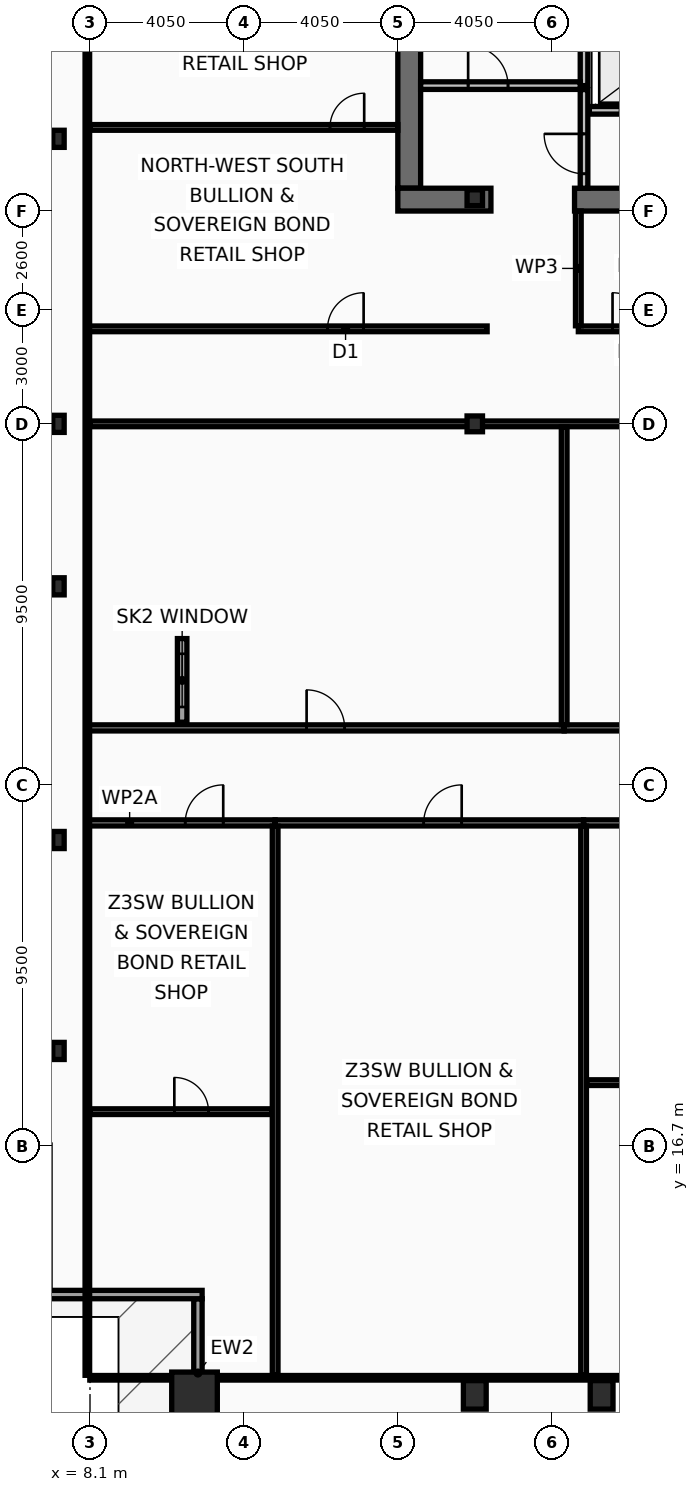
"""IFC4 building model, lengths in metres.
Left out: names, types, materials, properties, quantities, classifications, styles, units other than length and angle.
Written with IfcOpenShell. Run it as: python <this file> out.ifc"""

import sys

from ifc_helpers import new_model, si_unit, direction, frame, frame_2d, origin, origin_2d, place, context, subcontext, project, spatial, rectangle, hollow_rectangle, i_section, extrude, element, fill, save


model = new_model("IFC4")
c1 = context("Model", 3, precision=1e-05, world=origin(), true_north=direction((0.0, 1.0)))
c2 = subcontext(c1, "Body", "Model", "MODEL_VIEW")
j1 = project(units=[si_unit("LENGTHUNIT", "METRE"), si_unit("PLANEANGLEUNIT", "RADIAN")], contexts=[c1])
p1 = place(None, origin())
s1 = spatial("IfcSite", under=j1, at=p1, CompositionType="ELEMENT")
p2 = place(p1, origin())
s2 = spatial("IfcBuilding", under=s1, at=p2, CompositionType="ELEMENT")
p3 = place(p2, frame((0.0, 0.0, 188.6)))
s3 = spatial("IfcBuildingStorey", under=s2, at=p3, CompositionType="ELEMENT", Elevation=188.6)
p4 = place(p3, frame((16.5, 41.9, 0.0), z_axis=(0.0, 0.0, 1.0), x_axis=(0.0, 1.0, 0.0)))
e1 = element("IfcWall", 1, at=p4, inside=s3, PredefinedType="SHEAR", context=c2, shape_type="SweptSolid", body=[
    extrude(rectangle(XDim=11.2, YDim=0.6, at=frame_2d((5.6, 0.0))), origin(), (0.0, 0.0, 1.0), 3.44),
])
p5 = place(p3, frame((18.65, 41.6, 0.0), z_axis=(0.0, 0.0, 1.0), x_axis=(-1.0, 0.0, 0.0)))
e2 = element("IfcWall", 2, at=p5, inside=s3, PredefinedType="SHEAR", context=c2, shape_type="SweptSolid", body=[
    extrude(rectangle(XDim=2.45, YDim=0.6, at=frame_2d((1.225, 0.0))), origin(), (0.0, 0.0, 1.0), 3.44),
])
p6 = place(p3, frame((32.3, 41.6, 0.0), z_axis=(0.0, 0.0, 1.0), x_axis=(-1.0, 0.0, 0.0)))
e3 = element("IfcWall", 3, at=p6, inside=s3, PredefinedType="SHEAR", context=c2, shape_type="SweptSolid", body=[
    extrude(rectangle(XDim=11.45, YDim=0.6, at=frame_2d((5.725, 0.0))), origin(), (0.0, 0.0, 1.0), 3.44),
])
p7 = place(p3, frame((10.85, 10.15, 0.0), z_axis=(0.0, 0.0, 1.0), x_axis=(1.0, 0.0, 0.0)))
e4 = element("IfcColumn", 4, at=p7, inside=s3, PredefinedType="COLUMN", context=c2, shape_type="SweptSolid", body=[
    extrude(hollow_rectangle(XDim=1.2, YDim=1.2, WallThickness=0.06, at=origin_2d()), origin(), (0.0, 0.0, 1.0), 3.6),
])
for number, where, z_axis, x_axis in (
    (5, (18.225, 10.15, 0.0), (0.0, 0.0, 1.0), (1.0, 0.0, 0.0)),
    (6, (21.562, 10.15, 0.0), (0.0, 0.0, 1.0), (1.0, 0.0, 0.0)),
):
    element("IfcColumn", number, at=place(p3, frame(where, z_axis=z_axis, x_axis=x_axis)), inside=s3, PredefinedType="COLUMN", context=c2, shape_type="SweptSolid", body=[
        extrude(hollow_rectangle(XDim=0.6, YDim=0.75, WallThickness=0.045, at=origin_2d()), origin(), (0.0, 0.0, 1.0), 3.6),
    ])
for number, where, z_axis, x_axis in (
    (7, (7.27, 19.2, 0.0), (0.0, 0.0, 1.0), (1.0, 0.0, 0.0)),
    (8, (7.27, 24.75, 0.0), (0.0, 0.0, 1.0), (1.0, 0.0, 0.0)),
    (9, (7.27, 31.425, 0.0), (0.0, 0.0, 1.0), (1.0, 0.0, 0.0)),
    (10, (7.27, 35.7, 0.0), (0.0, 0.0, 1.0), (1.0, 0.0, 0.0)),
    (11, (7.27, 43.2, 0.0), (0.0, 0.0, 1.0), (1.0, 0.0, 0.0)),
):
    element("IfcColumn", number, at=place(p3, frame(where, z_axis=z_axis, x_axis=x_axis)), inside=s3, PredefinedType="COLUMN", context=c2, shape_type="SweptSolid", body=[
        extrude(i_section(OverallWidth=0.3, OverallDepth=0.45, WebThickness=0.014, FlangeThickness=0.026, at=origin_2d()), origin(), (0.0, 0.0, 1.0), 3.6),
    ])
for number, where, z_axis, x_axis in (
    (12, (18.225, 35.7, 0.0), (0.0, 0.0, 1.0), (1.0, 0.0, 0.0)),
    (13, (18.225, 41.65, 0.0), (0.0, 0.0, 1.0), (1.0, 0.0, 0.0)),
):
    element("IfcColumn", number, at=place(p3, frame(where, z_axis=z_axis, x_axis=x_axis)), inside=s3, PredefinedType="COLUMN", context=c2, shape_type="SweptSolid", body=[
        extrude(i_section(OverallWidth=0.406, OverallDepth=0.416, WebThickness=0.03, FlangeThickness=0.048, at=origin_2d()), origin(), (0.0, 0.0, 1.0), 3.6),
    ])
p8 = place(p3, frame((10.94, 8.77, 0.0), z_axis=(0.0, 0.0, 1.0), x_axis=(0.0, 1.0, 0.0)))
e14 = element("IfcWall", 14, at=p8, inside=s3, PredefinedType="SOLIDWALL", context=c2, shape_type="SweptSolid", body=[
    extrude(rectangle(XDim=3.91, YDim=0.22, at=frame_2d((1.955, 0.0))), origin(), (0.0, 0.0, 1.0), 2.83),
])
p9 = place(p3, frame((11.05, 12.79, 0.0), z_axis=(0.0, 0.0, 1.0), x_axis=(-1.0, 0.0, 0.0)))
e15 = element("IfcWall", 15, at=p9, inside=s3, PredefinedType="SOLIDWALL", context=c2, shape_type="SweptSolid", body=[
    extrude(rectangle(XDim=4.22, YDim=0.22, at=frame_2d((2.11, 0.0))), origin(), (0.0, 0.0, 1.0), 2.83),
])
p10 = place(p3, frame((10.525, 27.85, 0.0), z_axis=(0.0, 0.0, 1.0), x_axis=(0.0, 1.0, 0.0)))
e16 = element("IfcWall", 16, at=p10, inside=s3, PredefinedType="PARAPET", context=c2, shape_type="SweptSolid", body=[
    extrude(rectangle(XDim=2.2, YDim=0.25, at=frame_2d((1.1, 0.0))), origin(), (0.0, 0.0, 1.0), 0.88),
])
p11 = place(p10, frame((0.4, 0.0, 0.16)))
e17 = element("IfcOpeningElement", 17, at=p11, cuts=e16, PredefinedType="OPENING", context=c2, shape_type="SweptSolid", body=[
    extrude(rectangle(XDim=1.4, YDim=0.5, at=frame_2d((0.7, 0.25))), frame((0.0, 0.135, 0.0), z_axis=(0.0, -1.0, 0.0), x_axis=(1.0, 0.0, 0.0)), (0.0, 0.0, 1.0), 0.27),
])
p12 = place(p3, frame((24.21, 43.95, 0.0), z_axis=(0.0, 0.0, 1.0), x_axis=(-1.0, 0.0, 0.0)))
e18 = element("IfcWall", 18, at=p12, inside=s3, PredefinedType="PARTITIONING", context=c2, shape_type="SweptSolid", body=[
    extrude(rectangle(XDim=2.97, YDim=0.2, at=frame_2d((1.485, 0.0))), origin(), (0.0, 0.0, 1.0), 3.44),
])
p13 = place(p12, frame((0.86, 0.0, 0.0)))
e19 = element("IfcOpeningElement", 19, at=p13, cuts=e18, PredefinedType="OPENING", context=c2, shape_type="SweptSolid", body=[
    extrude(rectangle(XDim=1.3, YDim=2.18, at=frame_2d((0.65, 1.09))), frame((0.0, 0.11, 0.0), z_axis=(0.0, -1.0, 0.0), x_axis=(1.0, 0.0, 0.0)), (0.0, 0.0, 1.0), 0.22),
])
p14 = place(p3, frame((21.1, 44.6, 0.0), z_axis=(0.0, 0.0, 1.0), x_axis=(0.0, 1.0, 0.0)))
e20 = element("IfcWall", 20, at=p14, inside=s3, PredefinedType="PARTITIONING", context=c2, shape_type="SweptSolid", body=[
    extrude(rectangle(XDim=4.3, YDim=0.2, at=frame_2d((2.15, 0.0))), origin(), (0.0, 0.0, 1.0), 3.44),
])
p15 = place(p3, frame((16.8, 44.6, 0.0), z_axis=(0.0, 0.0, 1.0), x_axis=(1.0, 0.0, 0.0)))
e21 = element("IfcWall", 21, at=p15, inside=s3, PredefinedType="PARTITIONING", context=c2, shape_type="SweptSolid", body=[
    extrude(rectangle(XDim=4.2, YDim=0.2, at=frame_2d((2.1, 0.0))), origin(), (0.0, 0.0, 1.0), 3.44),
])
p16 = place(p15, frame((1.25, 0.0, 0.0)))
e22 = element("IfcOpeningElement", 22, at=p16, cuts=e21, PredefinedType="OPENING", context=c2, shape_type="SweptSolid", body=[
    extrude(rectangle(XDim=1.05, YDim=2.15, at=frame_2d((0.525, 1.075))), frame((0.0, 0.11, 0.0), z_axis=(0.0, -1.0, 0.0), x_axis=(1.0, 0.0, 0.0)), (0.0, 0.0, 1.0), 0.22),
])
p17 = place(p3, frame((21.1, 41.9, 0.0), z_axis=(0.0, 0.0, 1.0), x_axis=(0.0, 1.0, 0.0)))
e23 = element("IfcWall", 23, at=p17, inside=s3, PredefinedType="PARTITIONING", context=c2, shape_type="SweptSolid", body=[
    extrude(rectangle(XDim=2.595, YDim=0.2, at=frame_2d((1.298, 0.0))), origin(), (0.0, 0.0, 1.0), 3.44),
])
p18 = place(p17, frame((0.38, 0.0, 0.0)))
e24 = element("IfcOpeningElement", 24, at=p18, cuts=e23, PredefinedType="OPENING", context=c2, shape_type="SweptSolid", body=[
    extrude(rectangle(XDim=1.05, YDim=2.15, at=frame_2d((0.525, 1.075))), frame((0.0, 0.11, 0.0), z_axis=(0.0, -1.0, 0.0), x_axis=(1.0, 0.0, 0.0)), (0.0, 0.0, 1.0), 0.22),
])
p19 = place(p3, frame((20.95, 38.2, 0.0), z_axis=(0.0, 0.0, 1.0), x_axis=(1.0, 0.0, 0.0)))
e25 = element("IfcWall", 25, at=p19, inside=s3, PredefinedType="PARTITIONING", context=c2, shape_type="SweptSolid", body=[
    extrude(rectangle(XDim=3.35, YDim=0.15, at=frame_2d((1.675, 0.0))), origin(), (0.0, 0.0, 1.0), 3.44),
])
p20 = place(p19, frame((0.9, 0.0, 0.0)))
e26 = element("IfcOpeningElement", 26, at=p20, cuts=e25, PredefinedType="OPENING", context=c2, shape_type="SweptSolid", body=[
    extrude(rectangle(XDim=0.95, YDim=2.05, at=frame_2d((0.475, 1.025))), frame((0.0, 0.085, 0.0), z_axis=(0.0, -1.0, 0.0), x_axis=(1.0, 0.0, 0.0)), (0.0, 0.0, 1.0), 0.17),
])
p21 = place(p3, frame((20.95, 38.28, 0.0), z_axis=(0.0, 0.0, 1.0), x_axis=(0.0, 1.0, 0.0)))
e27 = element("IfcWall", 27, at=p21, inside=s3, PredefinedType="PARTITIONING", context=c2, shape_type="SweptSolid", body=[
    extrude(rectangle(XDim=3.02, YDim=0.15, at=frame_2d((1.51, 0.0))), origin(), (0.0, 0.0, 1.0), 3.44),
])
p22 = place(p3, frame((8.03, 38.2, 0.0), z_axis=(0.0, 0.0, 1.0), x_axis=(1.0, 0.0, 0.0)))
e28 = element("IfcWall", 28, at=p22, inside=s3, PredefinedType="PARTITIONING", context=c2, shape_type="SweptSolid", body=[
    extrude(rectangle(XDim=10.52, YDim=0.15, at=frame_2d((5.26, 0.0))), origin(), (0.0, 0.0, 1.0), 2.73),
])
p23 = place(p22, frame((6.32, 0.0, 0.0)))
e29 = element("IfcOpeningElement", 29, at=p23, cuts=e28, PredefinedType="OPENING", context=c2, shape_type="SweptSolid", body=[
    extrude(rectangle(XDim=0.95, YDim=2.05, at=frame_2d((0.475, 1.025))), frame((0.0, 0.085, 0.0), z_axis=(0.0, -1.0, 0.0), x_axis=(1.0, 0.0, 0.0)), (0.0, 0.0, 1.0), 0.17),
])
p24 = place(p3, frame((8.095, 43.5, 0.0), z_axis=(0.0, 0.0, 1.0), x_axis=(1.0, 0.0, 0.0)))
e30 = element("IfcWall", 30, at=p24, inside=s3, PredefinedType="PARTITIONING", context=c2, shape_type="SweptSolid", body=[
    extrude(rectangle(XDim=8.105, YDim=0.15, at=frame_2d((4.052, 0.0))), origin(), (0.0, 0.0, 1.0), 2.73),
])
p25 = place(p24, frame((6.32, 0.0, 0.0)))
e31 = element("IfcOpeningElement", 31, at=p25, cuts=e30, PredefinedType="OPENING", context=c2, shape_type="SweptSolid", body=[
    extrude(rectangle(XDim=0.9, YDim=2.05, at=frame_2d((0.45, 1.025))), frame((0.0, 0.085, 0.0), z_axis=(0.0, -1.0, 0.0), x_axis=(1.0, 0.0, 0.0)), (0.0, 0.0, 1.0), 0.17),
])
p26 = place(p3, frame((8.095, 35.7, 0.0), z_axis=(0.0, 0.0, 1.0), x_axis=(1.0, 0.0, 0.0)))
e32 = element("IfcWall", 32, at=p26, inside=s3, PredefinedType="PARTITIONING", context=c2, shape_type="SweptSolid", body=[
    extrude(rectangle(XDim=24.925, YDim=0.15, at=frame_2d((12.462, 0.0))), origin(), (0.0, 0.0, 1.0), 2.73),
])
p27 = place(p3, frame((8.03, 25.2, 0.0), z_axis=(0.0, 0.0, 1.0), x_axis=(1.0, 0.0, 0.0)))
e33 = element("IfcWall", 33, at=p27, inside=s3, PredefinedType="PARTITIONING", context=c2, shape_type="SweptSolid", body=[
    extrude(rectangle(XDim=4.942, YDim=0.16, at=frame_2d((2.471, 0.0))), origin(), (0.0, 0.0, 1.0), 3.44),
])
p28 = place(p27, frame((2.576, 0.0, 0.0)))
e34 = element("IfcOpeningElement", 34, at=p28, cuts=e33, PredefinedType="OPENING", context=c2, shape_type="SweptSolid", body=[
    extrude(rectangle(XDim=1.0, YDim=2.05, at=frame_2d((0.5, 1.025))), frame((0.0, 0.09, 0.0), z_axis=(0.0, -1.0, 0.0), x_axis=(1.0, 0.0, 0.0)), (0.0, 0.0, 1.0), 0.18),
])
p29 = place(p3, frame((8.095, 17.602, 0.0), z_axis=(0.0, 0.0, 1.0), x_axis=(1.0, 0.0, 0.0)))
e35 = element("IfcWall", 35, at=p29, inside=s3, PredefinedType="PARTITIONING", context=c2, shape_type="SweptSolid", body=[
    extrude(rectangle(XDim=4.797, YDim=0.15, at=frame_2d((2.398, 0.0))), origin(), (0.0, 0.0, 1.0), 2.83),
])
p30 = place(p29, frame((2.224, 0.0, 0.0)))
e36 = element("IfcOpeningElement", 36, at=p30, cuts=e35, PredefinedType="OPENING", context=c2, shape_type="SweptSolid", body=[
    extrude(rectangle(XDim=0.9, YDim=2.05, at=frame_2d((0.45, 1.025))), frame((0.0, 0.085, 0.0), z_axis=(0.0, -1.0, 0.0), x_axis=(1.0, 0.0, 0.0)), (0.0, 0.0, 1.0), 0.17),
])
p31 = place(p3, frame((12.972, 25.2, 0.0), z_axis=(0.0, 0.0, 1.0), x_axis=(1.0, 0.0, 0.0)))
e37 = element("IfcWall", 37, at=p31, inside=s3, PredefinedType="PARTITIONING", context=c2, shape_type="SweptSolid", body=[
    extrude(rectangle(XDim=8.116, YDim=0.16, at=frame_2d((4.058, 0.0))), origin(), (0.0, 0.0, 1.0), 2.73),
])
p32 = place(p31, frame((3.909, 0.0, 0.0)))
e38 = element("IfcOpeningElement", 38, at=p32, cuts=e37, PredefinedType="OPENING", context=c2, shape_type="SweptSolid", body=[
    extrude(rectangle(XDim=1.0, YDim=2.05, at=frame_2d((0.5, 1.025))), frame((0.0, 0.09, 0.0), z_axis=(0.0, -1.0, 0.0), x_axis=(1.0, 0.0, 0.0)), (0.0, 0.0, 1.0), 0.18),
])
p33 = place(p3, frame((12.972, 10.665, 0.0), z_axis=(0.0, 0.0, 1.0), x_axis=(0.0, 1.0, 0.0)))
e39 = element("IfcWall", 39, at=p33, inside=s3, PredefinedType="PARTITIONING", context=c2, shape_type="SweptSolid", body=[
    extrude(rectangle(XDim=14.45, YDim=0.15, at=frame_2d((7.225, 0.0))), origin(), (0.0, 0.0, 1.0), 2.73),
])
p34 = place(p3, frame((21.088, 25.2, 0.0), z_axis=(0.0, 0.0, 1.0), x_axis=(1.0, 0.0, 0.0)))
e40 = element("IfcWall", 40, at=p34, inside=s3, PredefinedType="PARTITIONING", context=c2, shape_type="SweptSolid", body=[
    extrude(rectangle(XDim=12.012, YDim=0.16, at=frame_2d((6.006, 0.0))), origin(), (0.0, 0.0, 1.0), 2.73),
])
p35 = place(p34, frame((5.545, 0.0, 0.0)))
e41 = element("IfcOpeningElement", 41, at=p35, cuts=e40, PredefinedType="OPENING", context=c2, shape_type="SweptSolid", body=[
    extrude(rectangle(XDim=1.0, YDim=2.05, at=frame_2d((0.5, 1.025))), frame((0.0, 0.09, 0.0), z_axis=(0.0, -1.0, 0.0), x_axis=(1.0, 0.0, 0.0)), (0.0, 0.0, 1.0), 0.18),
])
p36 = place(p3, frame((21.088, 10.665, 0.0), z_axis=(0.0, 0.0, 1.0), x_axis=(0.0, 1.0, 0.0)))
e42 = element("IfcWall", 42, at=p36, inside=s3, PredefinedType="PARTITIONING", context=c2, shape_type="SweptSolid", body=[
    extrude(rectangle(XDim=14.45, YDim=0.15, at=frame_2d((7.225, 0.0))), origin(), (0.0, 0.0, 1.0), 2.93),
])
p37 = place(p3, frame((21.168, 18.366, 0.0), z_axis=(0.0, 0.0, 1.0), x_axis=(1.0, 0.0, 0.0)))
e43 = element("IfcWall", 43, at=p37, inside=s3, PredefinedType="PARTITIONING", context=c2, shape_type="SweptSolid", body=[
    extrude(rectangle(XDim=11.852, YDim=0.15, at=frame_2d((5.926, 0.0))), origin(), (0.0, 0.0, 1.0), 2.73),
])
p38 = place(p37, frame((5.405, 0.0, 0.0)))
e44 = element("IfcOpeningElement", 44, at=p38, cuts=e43, PredefinedType="OPENING", context=c2, shape_type="SweptSolid", body=[
    extrude(rectangle(XDim=0.9, YDim=2.05, at=frame_2d((0.45, 1.025))), frame((0.0, 0.085, 0.0), z_axis=(0.0, -1.0, 0.0), x_axis=(1.0, 0.0, 0.0)), (0.0, 0.0, 1.0), 0.17),
])
p39 = place(p3, frame((8.03, 27.7, 0.0), z_axis=(0.0, 0.0, 1.0), x_axis=(1.0, 0.0, 0.0)))
e45 = element("IfcWall", 45, at=p39, inside=s3, PredefinedType="PARTITIONING", context=c2, shape_type="SweptSolid", body=[
    extrude(rectangle(XDim=12.547, YDim=0.16, at=frame_2d((6.273, 0.0))), origin(), (0.0, 0.0, 1.0), 2.73),
])
p40 = place(p39, frame((5.77, 0.0, 0.0)))
e46 = element("IfcOpeningElement", 46, at=p40, cuts=e45, PredefinedType="OPENING", context=c2, shape_type="SweptSolid", body=[
    extrude(rectangle(XDim=1.0, YDim=2.05, at=frame_2d((0.5, 1.025))), frame((0.0, 0.09, 0.0), z_axis=(0.0, -1.0, 0.0), x_axis=(1.0, 0.0, 0.0)), (0.0, 0.0, 1.0), 0.18),
])
p41 = place(p3, frame((20.577, 27.7, 0.0), z_axis=(0.0, 0.0, 1.0), x_axis=(1.0, 0.0, 0.0)))
e47 = element("IfcWall", 47, at=p41, inside=s3, PredefinedType="PARTITIONING", context=c2, shape_type="SweptSolid", body=[
    extrude(rectangle(XDim=12.523, YDim=0.16, at=frame_2d((6.261, 0.0))), origin(), (0.0, 0.0, 1.0), 2.73),
])
p42 = place(p41, frame((5.76, 0.0, 0.0)))
e48 = element("IfcOpeningElement", 48, at=p42, cuts=e47, PredefinedType="OPENING", context=c2, shape_type="SweptSolid", body=[
    extrude(rectangle(XDim=1.0, YDim=2.05, at=frame_2d((0.5, 1.025))), frame((0.0, 0.09, 0.0), z_axis=(0.0, -1.0, 0.0), x_axis=(1.0, 0.0, 0.0)), (0.0, 0.0, 1.0), 0.18),
])
p43 = place(p3, frame((20.577, 27.785, 0.0), z_axis=(0.0, 0.0, 1.0), x_axis=(0.0, 1.0, 0.0)))
e49 = element("IfcWall", 49, at=p43, inside=s3, PredefinedType="PARTITIONING", context=c2, shape_type="SweptSolid", body=[
    extrude(rectangle(XDim=7.835, YDim=0.15, at=frame_2d((3.917, 0.0))), origin(), (0.0, 0.0, 1.0), 2.93),
])
p44 = place(p3, frame((8.03, 10.665, 0.0), z_axis=(0.0, 0.0, 1.0), x_axis=(0.0, 1.0, 0.0)))
e50 = element("IfcWall", 50, at=p44, inside=s3, PredefinedType="PARTITIONING", context=c2, shape_type="SweptSolid", body=[
    extrude(rectangle(XDim=42.11, YDim=0.12, at=frame_2d((21.055, 0.0))), origin(), (0.0, 0.0, 1.0), 2.73),
])
p45 = place(p3, frame((8.095, 10.6, 0.0), z_axis=(0.0, 0.0, 1.0), x_axis=(1.0, 0.0, 0.0)))
e51 = element("IfcWall", 51, at=p45, inside=s3, PredefinedType="PARTITIONING", context=c2, shape_type="SweptSolid", body=[
    extrude(rectangle(XDim=56.71, YDim=0.12, at=frame_2d((28.355, 0.0))), origin(), (0.0, 0.0, 1.0), 2.73),
])
p46 = place(p11, origin())
e52 = element("IfcWindow", 52, at=p46, inside=s3, PartitioningType="SINGLE_PANEL", PredefinedType="SKYLIGHT", context=c2, shape_type="SweptSolid", body=[
    extrude(rectangle(XDim=1.4, YDim=0.5, at=frame_2d((0.7, 0.25))), frame((0.0, 0.03, 0.0), z_axis=(0.0, -1.0, 0.0), x_axis=(1.0, 0.0, 0.0)), (0.0, 0.0, 1.0), 0.06),
])
fill(e17, e52)
p47 = place(p16, origin())
e53 = element("IfcDoor", 53, at=p47, inside=s3, OperationType="SINGLE_SWING_LEFT", PredefinedType="DOOR", context=c2, shape_type="SweptSolid", body=[
    extrude(rectangle(XDim=1.05, YDim=2.15, at=frame_2d((0.525, 1.075))), frame((0.0, 0.025, 0.0), z_axis=(0.0, -1.0, 0.0), x_axis=(1.0, 0.0, 0.0)), (0.0, 0.0, 1.0), 0.05),
])
fill(e22, e53)
p48 = place(p18, origin())
e54 = element("IfcDoor", 54, at=p48, inside=s3, OperationType="SINGLE_SWING_RIGHT", PredefinedType="DOOR", context=c2, shape_type="SweptSolid", body=[
    extrude(rectangle(XDim=1.05, YDim=2.15, at=frame_2d((0.525, 1.075))), frame((0.0, 0.025, 0.0), z_axis=(0.0, -1.0, 0.0), x_axis=(1.0, 0.0, 0.0)), (0.0, 0.0, 1.0), 0.05),
])
fill(e24, e54)
p49 = place(p20, origin())
e55 = element("IfcDoor", 55, at=p49, inside=s3, OperationType="SINGLE_SWING_LEFT", PredefinedType="DOOR", context=c2, shape_type="SweptSolid", body=[
    extrude(rectangle(XDim=0.95, YDim=2.05, at=frame_2d((0.475, 1.025))), frame((0.0, 0.025, 0.0), z_axis=(0.0, -1.0, 0.0), x_axis=(1.0, 0.0, 0.0)), (0.0, 0.0, 1.0), 0.05),
])
fill(e26, e55)
p50 = place(p23, origin())
e56 = element("IfcDoor", 56, at=p50, inside=s3, OperationType="SINGLE_SWING_RIGHT", PredefinedType="DOOR", context=c2, shape_type="SweptSolid", body=[
    extrude(rectangle(XDim=0.95, YDim=2.05, at=frame_2d((0.475, 1.025))), frame((0.0, 0.025, 0.0), z_axis=(0.0, -1.0, 0.0), x_axis=(1.0, 0.0, 0.0)), (0.0, 0.0, 1.0), 0.05),
])
fill(e29, e56)
p51 = place(p25, origin())
e57 = element("IfcDoor", 57, at=p51, inside=s3, OperationType="SINGLE_SWING_RIGHT", PredefinedType="DOOR", context=c2, shape_type="SweptSolid", body=[
    extrude(rectangle(XDim=0.9, YDim=2.05, at=frame_2d((0.45, 1.025))), frame((0.0, 0.025, 0.0), z_axis=(0.0, -1.0, 0.0), x_axis=(1.0, 0.0, 0.0)), (0.0, 0.0, 1.0), 0.05),
])
fill(e31, e57)
p52 = place(p28, origin())
e58 = element("IfcDoor", 58, at=p52, inside=s3, OperationType="SINGLE_SWING_RIGHT", PredefinedType="DOOR", context=c2, shape_type="SweptSolid", body=[
    extrude(rectangle(XDim=1.0, YDim=2.05, at=frame_2d((0.5, 1.025))), frame((0.0, 0.025, 0.0), z_axis=(0.0, -1.0, 0.0), x_axis=(1.0, 0.0, 0.0)), (0.0, 0.0, 1.0), 0.05),
])
fill(e34, e58)
p53 = place(p30, origin())
e59 = element("IfcDoor", 59, at=p53, inside=s3, OperationType="SINGLE_SWING_LEFT", PredefinedType="DOOR", context=c2, shape_type="SweptSolid", body=[
    extrude(rectangle(XDim=0.9, YDim=2.05, at=frame_2d((0.45, 1.025))), frame((0.0, 0.025, 0.0), z_axis=(0.0, -1.0, 0.0), x_axis=(1.0, 0.0, 0.0)), (0.0, 0.0, 1.0), 0.05),
])
fill(e36, e59)
p54 = place(p32, origin())
e60 = element("IfcDoor", 60, at=p54, inside=s3, OperationType="SINGLE_SWING_RIGHT", PredefinedType="DOOR", context=c2, shape_type="SweptSolid", body=[
    extrude(rectangle(XDim=1.0, YDim=2.05, at=frame_2d((0.5, 1.025))), frame((0.0, 0.025, 0.0), z_axis=(0.0, -1.0, 0.0), x_axis=(1.0, 0.0, 0.0)), (0.0, 0.0, 1.0), 0.05),
])
fill(e38, e60)
p55 = place(p40, origin())
e61 = element("IfcDoor", 61, at=p55, inside=s3, OperationType="SINGLE_SWING_LEFT", PredefinedType="DOOR", context=c2, shape_type="SweptSolid", body=[
    extrude(rectangle(XDim=1.0, YDim=2.05, at=frame_2d((0.5, 1.025))), frame((0.0, 0.025, 0.0), z_axis=(0.0, -1.0, 0.0), x_axis=(1.0, 0.0, 0.0)), (0.0, 0.0, 1.0), 0.05),
])
fill(e46, e61)
save(model, sys.argv[1])
